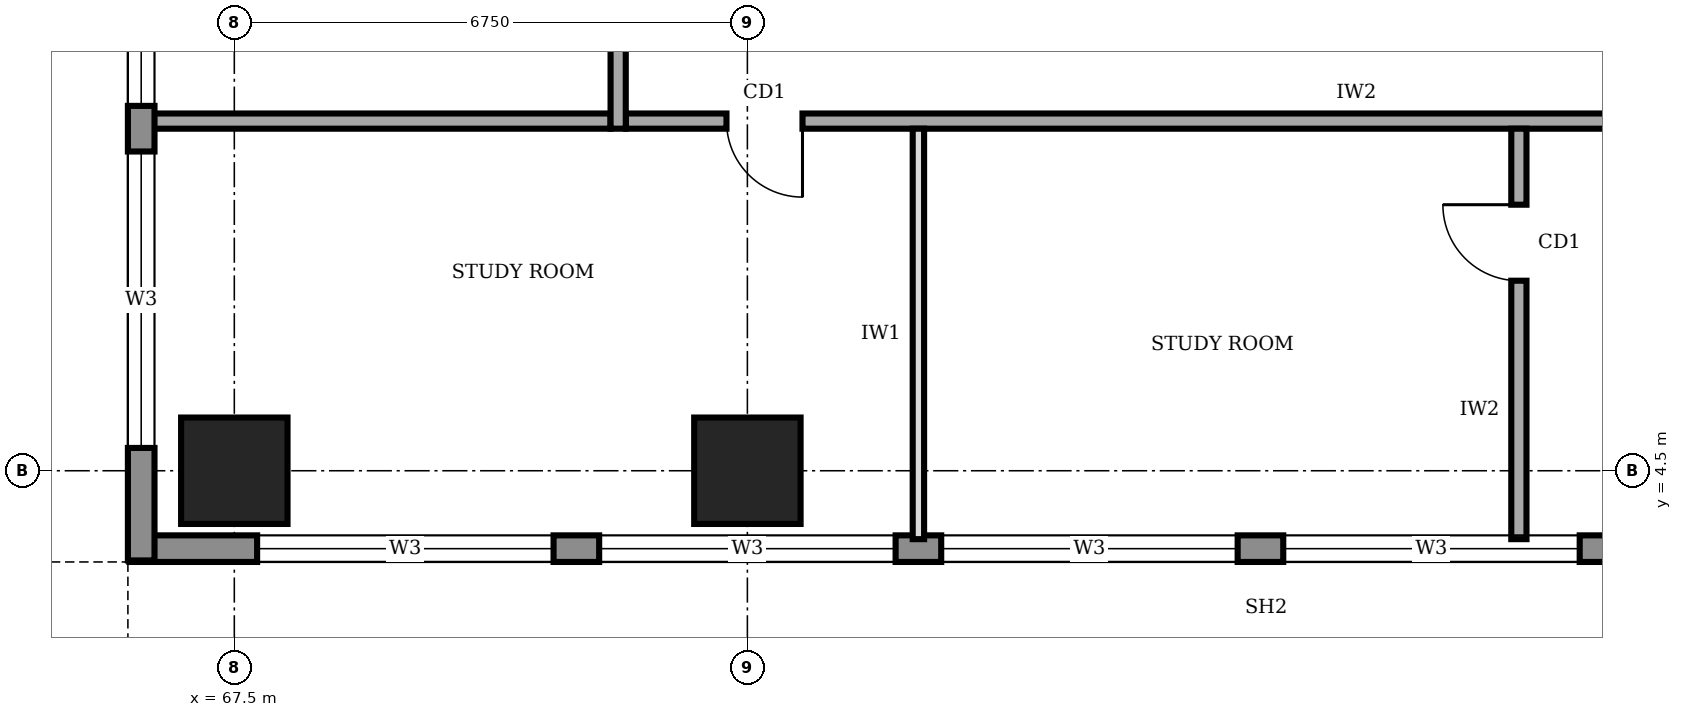
"""IFC4 building model, lengths in metres.
Left out: names, types, materials, properties, quantities, classifications, styles, units other than length and angle.
Written with IfcOpenShell. Run it as: python <this file> out.ifc"""

import sys

from ifc_helpers import new_model, si_unit, direction, frame, frame_2d, origin, origin_2d, place, context, subcontext, project, spatial, rectangle, extrude, element, fill, save


model = new_model("IFC4")
c1 = context("Model", 3, precision=1e-05, world=origin(), true_north=direction((0.0, 1.0)))
c2 = subcontext(c1, "Body", "Model", "MODEL_VIEW")
j1 = project(units=[si_unit("LENGTHUNIT", "METRE"), si_unit("PLANEANGLEUNIT", "RADIAN")], contexts=[c1])
p1 = place(None, origin())
s1 = spatial("IfcSite", under=j1, at=p1, CompositionType="ELEMENT")
p2 = place(p1, origin())
s2 = spatial("IfcBuilding", under=s1, at=p2, CompositionType="ELEMENT")
p3 = place(p2, frame((0.0, 0.0, 201.0)))
s3 = spatial("IfcBuildingStorey", under=s2, at=p3, CompositionType="ELEMENT", Elevation=201.0)
for number, where, z_axis, x_axis in (
    (1, (67.5, 4.5, 0.0), (0.0, 0.0, 1.0), (1.0, 0.0, 0.0)),
    (2, (74.25, 4.5, 0.0), (0.0, 0.0, 1.0), (1.0, 0.0, 0.0)),
):
    element("IfcColumn", number, at=place(p3, frame(where, z_axis=z_axis, x_axis=x_axis)), inside=s3, PredefinedType="COLUMN", context=c2, shape_type="SweptSolid", body=[
        extrude(rectangle(XDim=1.4, YDim=1.4, at=origin_2d()), origin(), (0.0, 0.0, 1.0), 4.0),
    ])
p4 = place(p3, frame((66.12, 3.475, 0.0), z_axis=(0.0, 0.0, 1.0), x_axis=(1.0, 0.0, 0.0)))
e3 = element("IfcWall", 3, at=p4, inside=s3, PredefinedType="STANDARD", context=c2, shape_type="SweptSolid", body=[
    extrude(rectangle(XDim=29.91, YDim=0.35, at=frame_2d((14.955, 0.0))), origin(), (0.0, 0.0, 1.0), 3.75),
])
p5 = place(p4, frame((1.68, 0.0, 0.95)))
e4 = element("IfcOpeningElement", 4, at=p5, cuts=e3, PredefinedType="OPENING", context=c2, shape_type="SweptSolid", body=[
    extrude(rectangle(XDim=3.9, YDim=1.8, at=frame_2d((1.95, 0.9))), frame((0.0, 0.185, 0.0), z_axis=(0.0, -1.0, 0.0), x_axis=(1.0, 0.0, 0.0)), (0.0, 0.0, 1.0), 0.37),
])
p6 = place(p4, frame((6.18, 0.0, 0.95)))
e5 = element("IfcOpeningElement", 5, at=p6, cuts=e3, PredefinedType="OPENING", context=c2, shape_type="SweptSolid", body=[
    extrude(rectangle(XDim=3.9, YDim=1.8, at=frame_2d((1.95, 0.9))), frame((0.0, 0.185, 0.0), z_axis=(0.0, -1.0, 0.0), x_axis=(1.0, 0.0, 0.0)), (0.0, 0.0, 1.0), 0.37),
])
p7 = place(p4, frame((10.68, 0.0, 0.95)))
e6 = element("IfcOpeningElement", 6, at=p7, cuts=e3, PredefinedType="OPENING", context=c2, shape_type="SweptSolid", body=[
    extrude(rectangle(XDim=3.9, YDim=1.8, at=frame_2d((1.95, 0.9))), frame((0.0, 0.185, 0.0), z_axis=(0.0, -1.0, 0.0), x_axis=(1.0, 0.0, 0.0)), (0.0, 0.0, 1.0), 0.37),
])
p8 = place(p4, frame((15.18, 0.0, 0.95)))
e7 = element("IfcOpeningElement", 7, at=p8, cuts=e3, PredefinedType="OPENING", context=c2, shape_type="SweptSolid", body=[
    extrude(rectangle(XDim=3.9, YDim=1.8, at=frame_2d((1.95, 0.9))), frame((0.0, 0.185, 0.0), z_axis=(0.0, -1.0, 0.0), x_axis=(1.0, 0.0, 0.0)), (0.0, 0.0, 1.0), 0.37),
])
p9 = place(p4, frame((19.68, 0.0, 0.95)))
e8 = element("IfcOpeningElement", 8, at=p9, cuts=e3, PredefinedType="OPENING", context=c2, shape_type="SweptSolid", body=[
    extrude(rectangle(XDim=3.9, YDim=1.8, at=frame_2d((1.95, 0.9))), frame((0.0, 0.185, 0.0), z_axis=(0.0, -1.0, 0.0), x_axis=(1.0, 0.0, 0.0)), (0.0, 0.0, 1.0), 0.37),
])
p10 = place(p4, frame((24.18, 0.0, 0.95)))
e9 = element("IfcOpeningElement", 9, at=p10, cuts=e3, PredefinedType="OPENING", context=c2, shape_type="SweptSolid", body=[
    extrude(rectangle(XDim=3.9, YDim=1.8, at=frame_2d((1.95, 0.9))), frame((0.0, 0.185, 0.0), z_axis=(0.0, -1.0, 0.0), x_axis=(1.0, 0.0, 0.0)), (0.0, 0.0, 1.0), 0.37),
])
p11 = place(p3, frame((66.275, 37.18, 0.0), z_axis=(0.0, 0.0, 1.0), x_axis=(0.0, -1.0, 0.0)))
e10 = element("IfcWall", 10, at=p11, inside=s3, PredefinedType="STANDARD", context=c2, shape_type="SweptSolid", body=[
    extrude(rectangle(XDim=33.86, YDim=0.35, at=frame_2d((16.93, 0.0))), origin(), (0.0, 0.0, 1.0), 3.75),
])
p12 = place(p11, frame((28.48, 0.0, 0.95)))
e11 = element("IfcOpeningElement", 11, at=p12, cuts=e10, PredefinedType="OPENING", context=c2, shape_type="SweptSolid", body=[
    extrude(rectangle(XDim=3.9, YDim=1.8, at=frame_2d((1.95, 0.9))), frame((0.0, 0.185, 0.0), z_axis=(0.0, -1.0, 0.0), x_axis=(1.0, 0.0, 0.0)), (0.0, 0.0, 1.0), 0.37),
])
p13 = place(p11, frame((23.98, 0.0, 0.95)))
e12 = element("IfcOpeningElement", 12, at=p13, cuts=e10, PredefinedType="OPENING", context=c2, shape_type="SweptSolid", body=[
    extrude(rectangle(XDim=3.9, YDim=1.8, at=frame_2d((1.95, 0.9))), frame((0.0, 0.185, 0.0), z_axis=(0.0, -1.0, 0.0), x_axis=(1.0, 0.0, 0.0)), (0.0, 0.0, 1.0), 0.37),
])
p14 = place(p11, frame((19.48, 0.0, 0.95)))
e13 = element("IfcOpeningElement", 13, at=p14, cuts=e10, PredefinedType="OPENING", context=c2, shape_type="SweptSolid", body=[
    extrude(rectangle(XDim=3.9, YDim=1.8, at=frame_2d((1.95, 0.9))), frame((0.0, 0.185, 0.0), z_axis=(0.0, -1.0, 0.0), x_axis=(1.0, 0.0, 0.0)), (0.0, 0.0, 1.0), 0.37),
])
p15 = place(p11, frame((14.98, 0.0, 0.95)))
e14 = element("IfcOpeningElement", 14, at=p15, cuts=e10, PredefinedType="OPENING", context=c2, shape_type="SweptSolid", body=[
    extrude(rectangle(XDim=3.9, YDim=1.8, at=frame_2d((1.95, 0.9))), frame((0.0, 0.185, 0.0), z_axis=(0.0, -1.0, 0.0), x_axis=(1.0, 0.0, 0.0)), (0.0, 0.0, 1.0), 0.37),
])
p16 = place(p11, frame((10.48, 0.0, 0.95)))
e15 = element("IfcOpeningElement", 15, at=p16, cuts=e10, PredefinedType="OPENING", context=c2, shape_type="SweptSolid", body=[
    extrude(rectangle(XDim=3.9, YDim=1.8, at=frame_2d((1.95, 0.9))), frame((0.0, 0.185, 0.0), z_axis=(0.0, -1.0, 0.0), x_axis=(1.0, 0.0, 0.0)), (0.0, 0.0, 1.0), 0.37),
])
p17 = place(p11, frame((5.98, 0.0, 0.95)))
e16 = element("IfcOpeningElement", 16, at=p17, cuts=e10, PredefinedType="OPENING", context=c2, shape_type="SweptSolid", body=[
    extrude(rectangle(XDim=3.9, YDim=1.8, at=frame_2d((1.95, 0.9))), frame((0.0, 0.185, 0.0), z_axis=(0.0, -1.0, 0.0), x_axis=(1.0, 0.0, 0.0)), (0.0, 0.0, 1.0), 0.37),
])
p18 = place(p11, frame((1.48, 0.0, 0.95)))
e17 = element("IfcOpeningElement", 17, at=p18, cuts=e10, PredefinedType="OPENING", context=c2, shape_type="SweptSolid", body=[
    extrude(rectangle(XDim=3.9, YDim=1.8, at=frame_2d((1.95, 0.9))), frame((0.0, 0.185, 0.0), z_axis=(0.0, -1.0, 0.0), x_axis=(1.0, 0.0, 0.0)), (0.0, 0.0, 1.0), 0.37),
])
p19 = place(p3, frame((72.65, 9.1, 0.0), z_axis=(0.0, 0.0, 1.0), x_axis=(1.0, 0.0, 0.0)))
e18 = element("IfcWall", 18, at=p19, inside=s3, PredefinedType="SOLIDWALL", context=c2, shape_type="SweptSolid", body=[
    extrude(rectangle(XDim=16.9, YDim=0.2, at=frame_2d((8.45, 0.0))), origin(), (0.0, 0.0, 1.0), 3.75),
])
p20 = place(p19, frame((1.325, 0.0, 0.0)))
e19 = element("IfcOpeningElement", 19, at=p20, cuts=e18, PredefinedType="OPENING", context=c2, shape_type="SweptSolid", body=[
    extrude(rectangle(XDim=1.0, YDim=2.1, at=frame_2d((0.5, 1.05))), frame((0.0, 0.11, 0.0), z_axis=(0.0, -1.0, 0.0), x_axis=(1.0, 0.0, 0.0)), (0.0, 0.0, 1.0), 0.22),
])
p21 = place(p3, frame((72.55, 31.3, 0.0), z_axis=(0.0, 0.0, 1.0), x_axis=(0.0, -1.0, 0.0)))
e20 = element("IfcWall", 20, at=p21, inside=s3, PredefinedType="SOLIDWALL", context=c2, shape_type="SweptSolid", body=[
    extrude(rectangle(XDim=22.3, YDim=0.2, at=frame_2d((11.15, 0.0))), origin(), (0.0, 0.0, 1.0), 3.75),
])
p22 = place(p21, frame((17.375, 0.0, 0.0)))
e21 = element("IfcOpeningElement", 21, at=p22, cuts=e20, PredefinedType="OPENING", context=c2, shape_type="SweptSolid", body=[
    extrude(rectangle(XDim=1.0, YDim=2.1, at=frame_2d((0.5, 1.05))), frame((0.0, 0.11, 0.0), z_axis=(0.0, -1.0, 0.0), x_axis=(1.0, 0.0, 0.0)), (0.0, 0.0, 1.0), 0.22),
])
p23 = place(p21, frame((10.55, 0.0, 0.0)))
e22 = element("IfcOpeningElement", 22, at=p23, cuts=e20, PredefinedType="OPENING", context=c2, shape_type="SweptSolid", body=[
    extrude(rectangle(XDim=1.0, YDim=2.1, at=frame_2d((0.5, 1.05))), frame((0.0, 0.11, 0.0), z_axis=(0.0, -1.0, 0.0), x_axis=(1.0, 0.0, 0.0)), (0.0, 0.0, 1.0), 0.22),
])
p24 = place(p21, frame((3.725, 0.0, 0.0)))
e23 = element("IfcOpeningElement", 23, at=p24, cuts=e20, PredefinedType="OPENING", context=c2, shape_type="SweptSolid", body=[
    extrude(rectangle(XDim=1.0, YDim=2.1, at=frame_2d((0.5, 1.05))), frame((0.0, 0.11, 0.0), z_axis=(0.0, -1.0, 0.0), x_axis=(1.0, 0.0, 0.0)), (0.0, 0.0, 1.0), 0.22),
])
p25 = place(p3, frame((84.4, 3.6, 0.0), z_axis=(0.0, 0.0, 1.0), x_axis=(0.0, 1.0, 0.0)))
e24 = element("IfcWall", 24, at=p25, inside=s3, PredefinedType="SOLIDWALL", context=c2, shape_type="SweptSolid", body=[
    extrude(rectangle(XDim=5.4, YDim=0.2, at=frame_2d((2.7, 0.0))), origin(), (0.0, 0.0, 1.0), 3.75),
])
p26 = place(p25, frame((3.4, 0.0, 0.0)))
e25 = element("IfcOpeningElement", 25, at=p26, cuts=e24, PredefinedType="OPENING", context=c2, shape_type="SweptSolid", body=[
    extrude(rectangle(XDim=1.0, YDim=2.1, at=frame_2d((0.5, 1.05))), frame((0.0, 0.11, 0.0), z_axis=(0.0, -1.0, 0.0), x_axis=(1.0, 0.0, 0.0)), (0.0, 0.0, 1.0), 0.22),
])
p27 = place(p3, frame((66.4, 9.1, 0.0), z_axis=(0.0, 0.0, 1.0), x_axis=(1.0, 0.0, 0.0)))
e26 = element("IfcWall", 26, at=p27, inside=s3, PredefinedType="SOLIDWALL", context=c2, shape_type="SweptSolid", body=[
    extrude(rectangle(XDim=6.05, YDim=0.2, at=frame_2d((3.025, 0.0))), origin(), (0.0, 0.0, 1.0), 3.75),
])
p28 = place(p3, frame((76.5, 3.6, 0.0), z_axis=(0.0, 0.0, 1.0), x_axis=(0.0, 1.0, 0.0)))
e27 = element("IfcWall", 27, at=p28, inside=s3, PredefinedType="PARTITIONING", context=c2, shape_type="SweptSolid", body=[
    extrude(rectangle(XDim=5.4, YDim=0.15, at=frame_2d((2.7, 0.0))), origin(), (0.0, 0.0, 1.0), 3.75),
])
p29 = place(p5, origin())
e28 = element("IfcWindow", 28, at=p29, inside=s3, PartitioningType="SINGLE_PANEL", PredefinedType="WINDOW", context=c2, shape_type="SweptSolid", body=[
    extrude(rectangle(XDim=3.9, YDim=1.8, at=frame_2d((1.95, 0.9))), frame((0.0, 0.03, 0.0), z_axis=(0.0, -1.0, 0.0), x_axis=(1.0, 0.0, 0.0)), (0.0, 0.0, 1.0), 0.06),
])
fill(e4, e28)
p30 = place(p6, origin())
e29 = element("IfcWindow", 29, at=p30, inside=s3, PartitioningType="SINGLE_PANEL", PredefinedType="WINDOW", context=c2, shape_type="SweptSolid", body=[
    extrude(rectangle(XDim=3.9, YDim=1.8, at=frame_2d((1.95, 0.9))), frame((0.0, 0.03, 0.0), z_axis=(0.0, -1.0, 0.0), x_axis=(1.0, 0.0, 0.0)), (0.0, 0.0, 1.0), 0.06),
])
fill(e5, e29)
p31 = place(p7, origin())
e30 = element("IfcWindow", 30, at=p31, inside=s3, PartitioningType="SINGLE_PANEL", PredefinedType="WINDOW", context=c2, shape_type="SweptSolid", body=[
    extrude(rectangle(XDim=3.9, YDim=1.8, at=frame_2d((1.95, 0.9))), frame((0.0, 0.03, 0.0), z_axis=(0.0, -1.0, 0.0), x_axis=(1.0, 0.0, 0.0)), (0.0, 0.0, 1.0), 0.06),
])
fill(e6, e30)
p32 = place(p8, origin())
e31 = element("IfcWindow", 31, at=p32, inside=s3, PartitioningType="SINGLE_PANEL", PredefinedType="WINDOW", context=c2, shape_type="SweptSolid", body=[
    extrude(rectangle(XDim=3.9, YDim=1.8, at=frame_2d((1.95, 0.9))), frame((0.0, 0.03, 0.0), z_axis=(0.0, -1.0, 0.0), x_axis=(1.0, 0.0, 0.0)), (0.0, 0.0, 1.0), 0.06),
])
fill(e7, e31)
p33 = place(p12, origin())
e32 = element("IfcWindow", 32, at=p33, inside=s3, PartitioningType="SINGLE_PANEL", PredefinedType="WINDOW", context=c2, shape_type="SweptSolid", body=[
    extrude(rectangle(XDim=3.9, YDim=1.8, at=frame_2d((1.95, 0.9))), frame((0.0, 0.03, 0.0), z_axis=(0.0, -1.0, 0.0), x_axis=(1.0, 0.0, 0.0)), (0.0, 0.0, 1.0), 0.06),
])
fill(e11, e32)
p34 = place(p13, origin())
e33 = element("IfcWindow", 33, at=p34, inside=s3, PartitioningType="SINGLE_PANEL", PredefinedType="WINDOW", context=c2, shape_type="SweptSolid", body=[
    extrude(rectangle(XDim=3.9, YDim=1.8, at=frame_2d((1.95, 0.9))), frame((0.0, 0.03, 0.0), z_axis=(0.0, -1.0, 0.0), x_axis=(1.0, 0.0, 0.0)), (0.0, 0.0, 1.0), 0.06),
])
fill(e12, e33)
p35 = place(p20, frame((1.0, 0.0, 0.0), z_axis=(0.0, 0.0, 1.0), x_axis=(-1.0, 0.0, 0.0)))
e34 = element("IfcDoor", 34, at=p35, inside=s3, OperationType="SINGLE_SWING_LEFT", PredefinedType="DOOR", context=c2, shape_type="SweptSolid", body=[
    extrude(rectangle(XDim=1.0, YDim=2.1, at=frame_2d((0.5, 1.05))), frame((0.0, 0.025, 0.0), z_axis=(0.0, -1.0, 0.0), x_axis=(1.0, 0.0, 0.0)), (0.0, 0.0, 1.0), 0.05),
])
fill(e19, e34)
p36 = place(p26, origin())
e35 = element("IfcDoor", 35, at=p36, inside=s3, OperationType="SINGLE_SWING_RIGHT", PredefinedType="DOOR", context=c2, shape_type="SweptSolid", body=[
    extrude(rectangle(XDim=1.0, YDim=2.1, at=frame_2d((0.5, 1.05))), frame((0.0, 0.025, 0.0), z_axis=(0.0, -1.0, 0.0), x_axis=(1.0, 0.0, 0.0)), (0.0, 0.0, 1.0), 0.05),
])
fill(e25, e35)
save(model, sys.argv[1])
